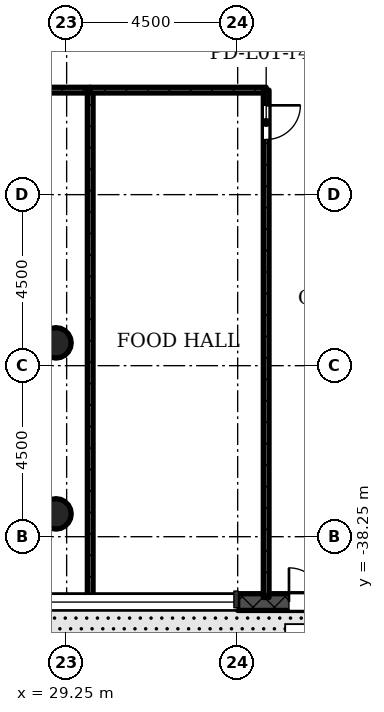
"""IFC4 building model, lengths in metres.
Left out: names, types, materials, properties, quantities, classifications, styles, units other than length and angle.
Written with IfcOpenShell. Run it as: python <this file> out.ifc"""

import sys

from ifc_helpers import new_model, si_unit, direction, frame, frame_2d, origin, origin_2d, place, context, subcontext, project, spatial, rectangle, hollow_circle, extrude, element, fill, save


model = new_model("IFC4")
c1 = context("Model", 3, precision=1e-05, world=origin(), true_north=direction((0.0, 1.0)))
c2 = subcontext(c1, "Body", "Model", "MODEL_VIEW")
j1 = project(units=[si_unit("LENGTHUNIT", "METRE"), si_unit("PLANEANGLEUNIT", "RADIAN")], contexts=[c1])
p1 = place(None, origin())
s1 = spatial("IfcSite", under=j1, at=p1, CompositionType="ELEMENT")
p2 = place(p1, origin())
s2 = spatial("IfcBuilding", under=s1, at=p2, CompositionType="ELEMENT")
p3 = place(p2, frame((0.0, 0.0, 6.0)))
s3 = spatial("IfcBuildingStorey", under=s2, at=p3, CompositionType="ELEMENT", Elevation=6.0)
p4 = place(p3, frame((28.97, -37.65, 0.0), z_axis=(0.0, 0.0, 1.0), x_axis=(1.0, 0.0, 0.0)))
e1 = element("IfcColumn", 1, at=p4, inside=s3, PredefinedType="COLUMN", context=c2, shape_type="SweptSolid", body=[
    extrude(hollow_circle(Radius=0.4, WallThickness=0.028, at=origin_2d()), origin(), (0.0, 0.0, 1.0), 4.58),
])
p5 = place(p3, frame((28.97, -33.15, 0.0), z_axis=(0.0, 0.0, 1.0), x_axis=(1.0, 0.0, 0.0)))
e2 = element("IfcColumn", 2, at=p5, inside=s3, PredefinedType="COLUMN", context=c2, shape_type="SweptSolid", body=[
    extrude(hollow_circle(Radius=0.4, WallThickness=0.028, at=origin_2d()), origin(), (0.0, 0.0, 1.0), 5.0),
])
p6 = place(p3, frame((33.75, -39.97, -0.02), z_axis=(0.0, 0.0, 1.0), x_axis=(1.0, 0.0, 0.0)))
e3 = element("IfcWall", 3, at=p6, inside=s3, PredefinedType="STANDARD", context=c2, shape_type="SweptSolid", body=[
    extrude(rectangle(XDim=4.5, YDim=0.44, at=frame_2d((2.25, 0.0))), origin(), (0.0, 0.0, 1.0), 4.72),
])
p7 = place(p6, frame((1.35, 0.0, 0.02)))
e4 = element("IfcOpeningElement", 4, at=p7, cuts=e3, PredefinedType="OPENING", context=c2, shape_type="SweptSolid", body=[
    extrude(rectangle(XDim=1.8, YDim=2.1, at=frame_2d((0.9, 1.05))), frame((0.0, 0.23, 0.0), z_axis=(0.0, -1.0, 0.0), x_axis=(1.0, 0.0, 0.0)), (0.0, 0.0, 1.0), 0.46),
])
p8 = place(p3, frame((20.95, -26.5, 0.0), z_axis=(0.0, 0.0, 1.0), x_axis=(1.0, 0.0, 0.0)))
e5 = element("IfcWall", 5, at=p8, inside=s3, PredefinedType="PARTITIONING", context=c2, shape_type="SweptSolid", body=[
    extrude(rectangle(XDim=8.92, YDim=0.15, at=frame_2d((4.46, 0.0))), origin(), (0.0, 0.0, 1.0), 4.58),
])
p9 = place(p8, frame((0.4, 0.0, 0.0)))
e6 = element("IfcOpeningElement", 6, at=p9, cuts=e5, PredefinedType="OPENING", context=c2, shape_type="SweptSolid", body=[
    extrude(rectangle(XDim=1.2, YDim=2.1, at=frame_2d((0.6, 1.05))), frame((0.0, 0.085, 0.0), z_axis=(0.0, -1.0, 0.0), x_axis=(1.0, 0.0, 0.0)), (0.0, 0.0, 1.0), 0.17),
])
p10 = place(p3, frame((29.87, -26.5, 0.0), z_axis=(0.0, 0.0, 1.0), x_axis=(0.0, -1.0, 0.0)))
e7 = element("IfcWall", 7, at=p10, inside=s3, PredefinedType="PARTITIONING", context=c2, shape_type="SweptSolid", body=[
    extrude(rectangle(XDim=13.35, YDim=0.15, at=frame_2d((6.675, 0.0))), origin(), (0.0, 0.0, 1.0), 4.58),
])
p11 = place(p3, frame((29.87, -26.5, 0.0), z_axis=(0.0, 0.0, 1.0), x_axis=(1.0, 0.0, 0.0)))
e8 = element("IfcWall", 8, at=p11, inside=s3, PredefinedType="PARTITIONING", context=c2, shape_type="SweptSolid", body=[
    extrude(rectangle(XDim=4.63, YDim=0.15, at=frame_2d((2.315, 0.0))), origin(), (0.0, 0.0, 1.0), 4.58),
])
p12 = place(p3, frame((34.5, -26.5, 0.0), z_axis=(0.0, 0.0, 1.0), x_axis=(0.0, -1.0, 0.0)))
e9 = element("IfcWall", 9, at=p12, inside=s3, PredefinedType="PARTITIONING", context=c2, shape_type="SweptSolid", body=[
    extrude(rectangle(XDim=13.35, YDim=0.15, at=frame_2d((6.675, 0.0))), origin(), (0.0, 0.0, 1.0), 4.58),
])
p13 = place(p12, frame((0.4, 0.0, 0.0)))
e10 = element("IfcOpeningElement", 10, at=p13, cuts=e9, PredefinedType="OPENING", context=c2, shape_type="SweptSolid", body=[
    extrude(rectangle(XDim=0.9, YDim=2.1, at=frame_2d((0.45, 1.05))), frame((0.0, 0.085, 0.0), z_axis=(0.0, -1.0, 0.0), x_axis=(1.0, 0.0, 0.0)), (0.0, 0.0, 1.0), 0.17),
])
p14 = place(p7, origin())
e11 = element("IfcDoor", 11, at=p14, inside=s3, OperationType="DOUBLE_DOOR_SINGLE_SWING", PredefinedType="DOOR", context=c2, shape_type="SweptSolid", body=[
    extrude(rectangle(XDim=1.8, YDim=2.1, at=frame_2d((0.9, 1.05))), frame((0.0, 0.025, 0.0), z_axis=(0.0, -1.0, 0.0), x_axis=(1.0, 0.0, 0.0)), (0.0, 0.0, 1.0), 0.05),
])
fill(e4, e11)
p15 = place(p13, origin())
e12 = element("IfcDoor", 12, at=p15, inside=s3, OperationType="SINGLE_SWING_RIGHT", PredefinedType="DOOR", context=c2, shape_type="SweptSolid", body=[
    extrude(rectangle(XDim=0.9, YDim=2.1, at=frame_2d((0.45, 1.05))), frame((0.0, 0.025, 0.0), z_axis=(0.0, -1.0, 0.0), x_axis=(1.0, 0.0, 0.0)), (0.0, 0.0, 1.0), 0.05),
])
fill(e10, e12)
save(model, sys.argv[1])
